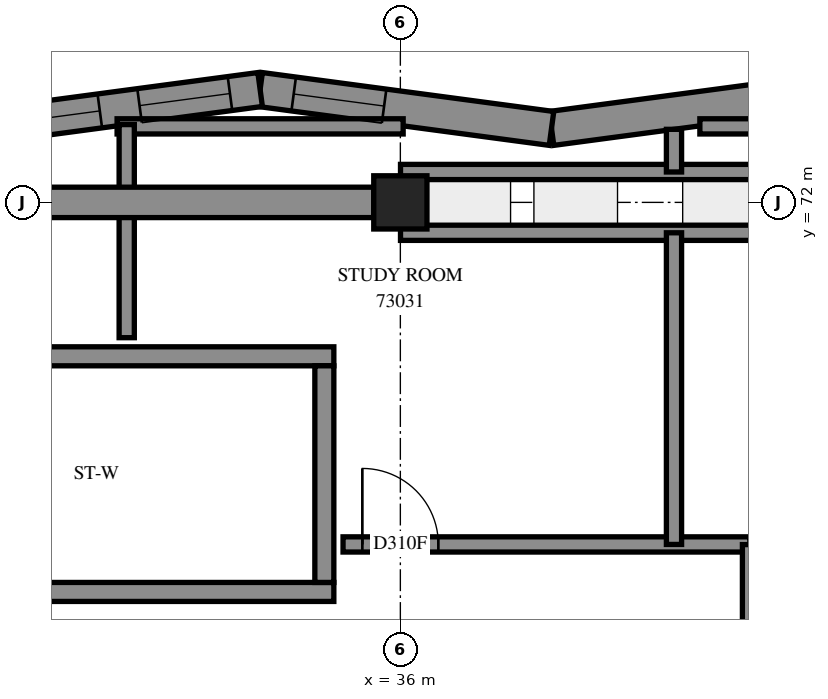
"""IFC4 building model, lengths in metres.
Left out: names, types, materials, properties, quantities, classifications, styles, units other than length and angle.
Written with IfcOpenShell. Run it as: python <this file> out.ifc"""

import sys

from ifc_helpers import new_model, si_unit, direction, frame, frame_2d, origin, origin_2d, place, context, subcontext, project, spatial, polyline, rectangle, outline, extrude, element, fill, save


model = new_model("IFC4")
c1 = context("Model", 3, precision=1e-05, world=origin(), true_north=direction((0.0, 1.0)))
c2 = subcontext(c1, "Body", "Model", "MODEL_VIEW")
j1 = project(units=[si_unit("LENGTHUNIT", "METRE"), si_unit("PLANEANGLEUNIT", "RADIAN")], contexts=[c1])
p1 = place(None, origin())
s1 = spatial("IfcSite", under=j1, at=p1, CompositionType="ELEMENT")
p2 = place(p1, origin())
s2 = spatial("IfcBuilding", under=s1, at=p2, CompositionType="ELEMENT")
p3 = place(p2, frame((0.0, 0.0, 267.6)))
s3 = spatial("IfcBuildingStorey", under=s2, at=p3, CompositionType="ELEMENT", Elevation=267.6)
p4 = place(p3, frame((36.0, 72.0, 0.0), z_axis=(0.0, 0.0, 1.0), x_axis=(1.0, 0.0, 0.0)))
e1 = element("IfcColumn", 1, at=p4, inside=s3, PredefinedType="COLUMN", context=c2, shape_type="SweptSolid", body=[
    extrude(rectangle(XDim=0.7, YDim=0.7, at=origin_2d()), origin(), (0.0, 0.0, 1.0), 3.1),
])
p5 = place(p3, frame((41.822, 73.485, 0.0), z_axis=(0.0, 0.0, 1.0), x_axis=(-0.9911985198, -0.13238389, 0.0)))
e2 = element("IfcWall", 2, at=p5, inside=s3, PredefinedType="SOLIDWALL", context=c2, shape_type="SweptSolid", body=[
    extrude(outline(polyline([(-0.03, -0.225), (3.837, -0.225), (3.898, 0.225), (0.03, 0.225), (-0.03, -0.225)])), origin(), (0.0, 0.0, 1.0), 3.1),
])
p6 = place(p3, frame((37.989, 72.973, 0.0), z_axis=(0.0, 0.0, 1.0), x_axis=(-0.9911989729, 0.1323804972, 0.0)))
e3 = element("IfcWall", 3, at=p6, inside=s3, PredefinedType="SOLIDWALL", context=c2, shape_type="SweptSolid", body=[
    extrude(outline(polyline([(0.03, -0.225), (3.898, -0.225), (3.837, 0.225), (-0.03, 0.225), (0.03, -0.225)])), origin(), (0.0, 0.0, 1.0), 3.1),
])
p7 = place(p6, frame((2.222, 0.0, 0.45)))
e4 = element("IfcOpeningElement", 4, at=p7, cuts=e3, PredefinedType="OPENING", context=c2, shape_type="SweptSolid", body=[
    extrude(rectangle(XDim=1.2, YDim=2.55, at=frame_2d((0.6, 1.275))), frame((0.0, 0.235, 0.0), z_axis=(0.0, -1.0, 0.0), x_axis=(1.0, 0.0, 0.0)), (0.0, 0.0, 1.0), 0.47),
])
p8 = place(p3, frame((34.155, 73.485, 0.0), z_axis=(0.0, 0.0, 1.0), x_axis=(-0.991198426, -0.1323845925, 0.0)))
e5 = element("IfcWall", 5, at=p8, inside=s3, PredefinedType="SOLIDWALL", context=c2, shape_type="SweptSolid", body=[
    extrude(outline(polyline([(-0.03, -0.225), (3.837, -0.225), (3.932, 0.225), (0.03, 0.225), (-0.03, -0.225)])), origin(), (0.0, 0.0, 1.0), 3.1),
])
p9 = place(p8, frame((0.4, 0.0, 0.45)))
e6 = element("IfcOpeningElement", 6, at=p9, cuts=e5, PredefinedType="OPENING", context=c2, shape_type="SweptSolid", body=[
    extrude(rectangle(XDim=1.2, YDim=2.55, at=frame_2d((0.6, 1.275))), frame((0.0, 0.235, 0.0), z_axis=(0.0, -1.0, 0.0), x_axis=(1.0, 0.0, 0.0)), (0.0, 0.0, 1.0), 0.47),
])
p10 = place(p8, frame((2.128, 0.0, 0.45)))
e7 = element("IfcOpeningElement", 7, at=p10, cuts=e5, PredefinedType="OPENING", context=c2, shape_type="SweptSolid", body=[
    extrude(rectangle(XDim=1.2, YDim=2.55, at=frame_2d((0.6, 1.275))), frame((0.0, 0.235, 0.0), z_axis=(0.0, -1.0, 0.0), x_axis=(1.0, 0.0, 0.0)), (0.0, 0.0, 1.0), 0.47),
])
p11 = place(p3, frame((28.875, 66.875, -0.3), z_axis=(0.0, 0.0, 1.0), x_axis=(1.0, 0.0, 0.0)))
e8 = element("IfcWall", 8, at=p11, inside=s3, PredefinedType="SOLIDWALL", context=c2, shape_type="SweptSolid", body=[
    extrude(rectangle(XDim=6.25, YDim=0.25, at=frame_2d((3.125, 0.0))), origin(), (0.0, 0.0, 1.0), 3.4),
])
p12 = place(p11, frame((0.525, 0.0, 0.3)))
e9 = element("IfcOpeningElement", 9, at=p12, cuts=e8, PredefinedType="OPENING", context=c2, shape_type="SweptSolid", body=[
    extrude(rectangle(XDim=0.8, YDim=2.1, at=frame_2d((0.4, 1.05))), frame((0.0, 0.135, 0.0), z_axis=(0.0, -1.0, 0.0), x_axis=(1.0, 0.0, 0.0)), (0.0, 0.0, 1.0), 0.27),
])
p13 = place(p3, frame((28.875, 69.975, -0.3), z_axis=(0.0, 0.0, 1.0), x_axis=(1.0, 0.0, 0.0)))
e10 = element("IfcWall", 10, at=p13, inside=s3, PredefinedType="SOLIDWALL", context=c2, shape_type="SweptSolid", body=[
    extrude(rectangle(XDim=6.25, YDim=0.25, at=frame_2d((3.125, 0.0))), origin(), (0.0, 0.0, 1.0), 3.4),
])
p14 = place(p3, frame((35.0, 67.0, -0.3), z_axis=(0.0, 0.0, 1.0), x_axis=(0.0, 1.0, 0.0)))
e11 = element("IfcWall", 11, at=p14, inside=s3, PredefinedType="SOLIDWALL", context=c2, shape_type="SweptSolid", body=[
    extrude(rectangle(XDim=2.85, YDim=0.25, at=frame_2d((1.425, 0.0))), origin(), (0.0, 0.0, 1.0), 3.4),
])
p15 = place(p3, frame((36.002, 71.6, 0.0), z_axis=(0.0, 0.0, 1.0), x_axis=(1.0, 0.0, 0.0)))
e12 = element("IfcWall", 12, at=p15, inside=s3, PredefinedType="PARTITIONING", context=c2, shape_type="SweptSolid", body=[
    extrude(rectangle(XDim=14.398, YDim=0.2, at=frame_2d((7.199, 0.0))), origin(), (0.0, 0.0, 1.0), 3.1),
])
p16 = place(p3, frame((36.002, 72.4, 0.0), z_axis=(0.0, 0.0, 1.0), x_axis=(1.0, 0.0, 0.0)))
e13 = element("IfcWall", 13, at=p16, inside=s3, PredefinedType="PARTITIONING", context=c2, shape_type="SweptSolid", body=[
    extrude(rectangle(XDim=14.396, YDim=0.2, at=frame_2d((7.198, 0.0))), origin(), (0.0, 0.0, 1.0), 3.1),
])
p17 = place(p3, frame((35.246, 67.5, 0.0), z_axis=(0.0, 0.0, 1.0), x_axis=(1.0, 0.0, 0.0)))
e14 = element("IfcWall", 14, at=p17, inside=s3, PredefinedType="PARTITIONING", context=c2, shape_type="SweptSolid", body=[
    extrude(rectangle(XDim=5.352, YDim=0.2, at=frame_2d((2.676, 0.0))), origin(), (0.0, 0.0, 1.0), 3.1),
])
p18 = place(p17, frame((0.254, 0.0, 0.0)))
e15 = element("IfcOpeningElement", 15, at=p18, cuts=e14, PredefinedType="OPENING", context=c2, shape_type="SweptSolid", body=[
    extrude(rectangle(XDim=1.0, YDim=2.1, at=frame_2d((0.5, 1.05))), frame((0.0, 0.11, 0.0), z_axis=(0.0, -1.0, 0.0), x_axis=(1.0, 0.0, 0.0)), (0.0, 0.0, 1.0), 0.22),
])
p19 = place(p3, frame((39.6, 67.5, 0.0), z_axis=(0.0, 0.0, 1.0), x_axis=(0.0, 1.0, 0.0)))
e16 = element("IfcWall", 16, at=p19, inside=s3, PredefinedType="PARTITIONING", context=c2, shape_type="SweptSolid", body=[
    extrude(rectangle(XDim=4.1, YDim=0.2, at=frame_2d((2.05, 0.0))), origin(), (0.0, 0.0, 1.0), 3.1),
])
for number, where, z_axis, x_axis in (
    (17, (32.273, 73.0, 0.0), (0.0, 0.0, 1.0), (1.0, 0.0, 0.0)),
    (18, (39.94, 73.0, 0.0), (0.0, 0.0, 1.0), (1.0, 0.0, 0.0)),
):
    element("IfcWall", number, at=place(p3, frame(where, z_axis=z_axis, x_axis=x_axis)), inside=s3, PredefinedType="PARTITIONING", context=c2, shape_type="SweptSolid", body=[
        extrude(rectangle(XDim=3.764, YDim=0.2, at=frame_2d((1.882, 0.0))), origin(), (0.0, 0.0, 1.0), 3.1),
    ])
p20 = place(p3, frame((32.4, 70.22, 0.0), z_axis=(0.0, 0.0, 1.0), x_axis=(0.0, 1.0, 0.0)))
e19 = element("IfcWall", 19, at=p20, inside=s3, PredefinedType="PARTITIONING", context=c2, shape_type="SweptSolid", body=[
    extrude(rectangle(XDim=2.804, YDim=0.2, at=frame_2d((1.402, 0.0))), origin(), (0.0, 0.0, 1.0), 3.1),
])
p21 = place(p3, frame((40.6, 65.2, 0.0), z_axis=(0.0, 0.0, 1.0), x_axis=(0.0, 1.0, 0.0)))
e20 = element("IfcWall", 20, at=p21, inside=s3, PredefinedType="PARTITIONING", context=c2, shape_type="SweptSolid", body=[
    extrude(rectangle(XDim=2.298, YDim=0.2, at=frame_2d((1.149, 0.0))), origin(), (0.0, 0.0, 1.0), 3.1),
])
p22 = place(p21, frame((0.203, 0.0, 0.0)))
e21 = element("IfcOpeningElement", 21, at=p22, cuts=e20, PredefinedType="OPENING", context=c2, shape_type="SweptSolid", body=[
    extrude(rectangle(XDim=1.0, YDim=2.1, at=frame_2d((0.5, 1.05))), frame((0.0, 0.11, 0.0), z_axis=(0.0, -1.0, 0.0), x_axis=(1.0, 0.0, 0.0)), (0.0, 0.0, 1.0), 0.22),
])
p23 = place(p3, frame((39.6, 72.4, 0.0), z_axis=(0.0, 0.0, 1.0), x_axis=(0.0, 1.0, 0.0)))
e22 = element("IfcWall", 22, at=p23, inside=s3, PredefinedType="PARTITIONING", context=c2, shape_type="SweptSolid", body=[
    extrude(rectangle(XDim=0.561, YDim=0.2, at=frame_2d((0.281, 0.0))), origin(), (0.0, 0.0, 1.0), 3.1),
])
p24 = place(p7, origin())
e23 = element("IfcWindow", 23, at=p24, inside=s3, PartitioningType="SINGLE_PANEL", PredefinedType="WINDOW", context=c2, shape_type="SweptSolid", body=[
    extrude(rectangle(XDim=1.2, YDim=2.55, at=frame_2d((0.6, 1.275))), frame((0.0, 0.135, 0.0), z_axis=(0.0, -1.0, 0.0), x_axis=(1.0, 0.0, 0.0)), (0.0, 0.0, 1.0), 0.06),
])
fill(e4, e23)
p25 = place(p9, origin())
e24 = element("IfcWindow", 24, at=p25, inside=s3, PartitioningType="SINGLE_PANEL", PredefinedType="WINDOW", context=c2, shape_type="SweptSolid", body=[
    extrude(rectangle(XDim=1.2, YDim=2.55, at=frame_2d((0.6, 1.275))), frame((0.0, 0.135, 0.0), z_axis=(0.0, -1.0, 0.0), x_axis=(1.0, 0.0, 0.0)), (0.0, 0.0, 1.0), 0.06),
])
fill(e6, e24)
p26 = place(p10, origin())
e25 = element("IfcWindow", 25, at=p26, inside=s3, PartitioningType="SINGLE_PANEL", PredefinedType="WINDOW", context=c2, shape_type="SweptSolid", body=[
    extrude(rectangle(XDim=1.2, YDim=2.55, at=frame_2d((0.6, 1.275))), frame((0.0, 0.205, 0.0), z_axis=(0.0, -1.0, 0.0), x_axis=(1.0, 0.0, 0.0)), (0.0, 0.0, 1.0), 0.06),
])
fill(e7, e25)
p27 = place(p18, origin())
e26 = element("IfcDoor", 26, at=p27, inside=s3, OperationType="SINGLE_SWING_LEFT", PredefinedType="DOOR", context=c2, shape_type="SweptSolid", body=[
    extrude(rectangle(XDim=1.0, YDim=2.1, at=frame_2d((0.5, 1.05))), frame((0.0, 0.025, 0.0), z_axis=(0.0, -1.0, 0.0), x_axis=(1.0, 0.0, 0.0)), (0.0, 0.0, 1.0), 0.05),
])
fill(e15, e26)
save(model, sys.argv[1])
